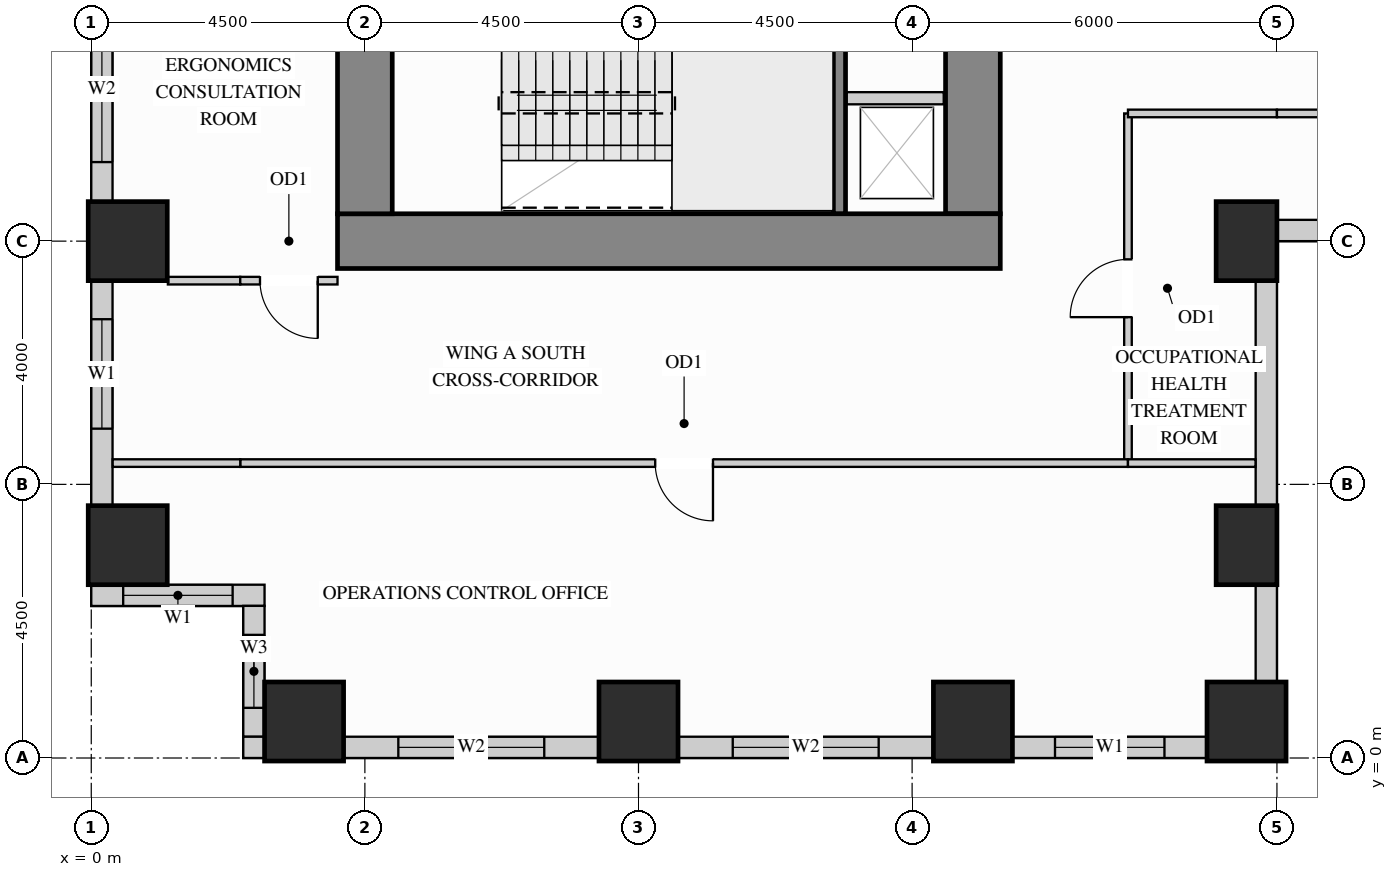
"""IFC4 building model, lengths in metres.
Left out: names, types, materials, properties, quantities, classifications, styles, units other than length and angle.
Written with IfcOpenShell. Run it as: python <this file> out.ifc"""

import sys

from ifc_helpers import new_model, si_unit, direction, frame, frame_2d, origin, origin_2d, place, context, subcontext, project, spatial, rectangle, extrude, source, transform, mapped, element, fill, save


model = new_model("IFC4")
c1 = context("Model", 3, precision=1e-05, world=origin(), true_north=direction((0.0, 1.0)))
c2 = subcontext(c1, "Body", "Model", "MODEL_VIEW")
j1 = project(units=[si_unit("LENGTHUNIT", "METRE"), si_unit("PLANEANGLEUNIT", "RADIAN")], contexts=[c1])
p1 = place(None, origin())
s1 = spatial("IfcSite", under=j1, at=p1, CompositionType="ELEMENT")
p2 = place(p1, origin())
s2 = spatial("IfcBuilding", under=s1, at=p2, CompositionType="ELEMENT")
p3 = place(p2, frame((0.0, 0.0, 54.9)))
s3 = spatial("IfcBuildingStorey", under=s2, at=p3, CompositionType="ELEMENT", Elevation=54.9)
m1 = source(origin(), c2, "Body", "SweptSolid", [
    extrude(rectangle(XDim=1.0, YDim=1.3, at=origin_2d()), origin(), (0.0, 0.0, 1.0), 3.38),
])
for number, where, z_axis, x_axis in (
    (1, (19.0, 3.5, 0.0), (0.0, 0.0, 1.0), (1.0, 0.0, 0.0)),
    (2, (19.0, 8.5, 0.0), (0.0, 0.0, 1.0), (1.0, 0.0, 0.0)),
):
    element("IfcColumn", number, at=place(p3, frame(where, z_axis=z_axis, x_axis=x_axis)), inside=s3, PredefinedType="COLUMN", context=c2, shape_type="MappedRepresentation", body=[
        mapped(m1, transform((0.0, 0.0, 0.0), x_axis=(1.0, 0.0, 0.0), y_axis=(0.0, 1.0, 0.0), z_axis=(0.0, 0.0, 1.0))),
    ])
m2 = source(origin(), c2, "Body", "SweptSolid", [
    extrude(rectangle(XDim=1.3, YDim=1.3, at=origin_2d()), origin(), (0.0, 0.0, 1.0), 3.38),
])
for number, where, z_axis, x_axis in (
    (3, (14.5, 0.6, 0.0), (0.0, 0.0, 1.0), (1.0, 0.0, 0.0)),
    (4, (19.0, 0.6, 0.0), (0.0, 0.0, 1.0), (1.0, 0.0, 0.0)),
    (5, (3.5, 0.6, 0.0), (0.0, 0.0, 1.0), (1.0, 0.0, 0.0)),
    (6, (9.0, 0.6, 0.0), (0.0, 0.0, 1.0), (1.0, 0.0, 0.0)),
    (7, (0.6, 3.5, 0.0), (0.0, 0.0, 1.0), (1.0, 0.0, 0.0)),
    (8, (0.6, 8.5, 0.0), (0.0, 0.0, 1.0), (1.0, 0.0, 0.0)),
):
    element("IfcColumn", number, at=place(p3, frame(where, z_axis=z_axis, x_axis=x_axis)), inside=s3, PredefinedType="COLUMN", context=c2, shape_type="MappedRepresentation", body=[
        mapped(m2, transform((0.0, 0.0, 0.0), x_axis=(1.0, 0.0, 0.0), y_axis=(0.0, 1.0, 0.0), z_axis=(0.0, 0.0, 1.0))),
    ])
m3 = source(origin(), c2, "Body", "SweptSolid", [
    extrude(rectangle(XDim=9.87, YDim=0.9, at=frame_2d((4.935, 0.0))), origin(), (0.0, 0.0, 1.0), 3.38),
])
p4 = place(p3, frame((14.5, 8.95, 0.0), z_axis=(0.0, 0.0, 1.0), x_axis=(0.0, 1.0, 0.0)))
e9 = element("IfcWall", 9, at=p4, inside=s3, PredefinedType="SHEAR", context=c2, shape_type="MappedRepresentation", body=[
    mapped(m3, transform((0.0, 0.0, 0.0), x_axis=(1.0, 0.0, 0.0), y_axis=(0.0, 1.0, 0.0), z_axis=(0.0, 0.0, 1.0))),
])
m4 = source(origin(), c2, "Body", "SweptSolid", [
    extrude(rectangle(XDim=10.9, YDim=0.9, at=frame_2d((5.45, 0.0))), origin(), (0.0, 0.0, 1.0), 3.38),
])
p5 = place(p3, frame((4.05, 8.5, 0.0), z_axis=(0.0, 0.0, 1.0), x_axis=(1.0, 0.0, 0.0)))
e10 = element("IfcWall", 10, at=p5, inside=s3, PredefinedType="SHEAR", context=c2, shape_type="MappedRepresentation", body=[
    mapped(m4, transform((0.0, 0.0, 0.0), x_axis=(1.0, 0.0, 0.0), y_axis=(0.0, 1.0, 0.0), z_axis=(0.0, 0.0, 1.0))),
])
m5 = source(origin(), c2, "Body", "SweptSolid", [
    extrude(rectangle(XDim=20.1, YDim=0.9, at=frame_2d((10.05, 0.0))), origin(), (0.0, 0.0, 1.0), 3.38),
])
p6 = place(p3, frame((4.5, 8.95, 0.0), z_axis=(0.0, 0.0, 1.0), x_axis=(0.0, 1.0, 0.0)))
e11 = element("IfcWall", 11, at=p6, inside=s3, PredefinedType="SHEAR", context=c2, shape_type="MappedRepresentation", body=[
    mapped(m5, transform((0.0, 0.0, 0.0), x_axis=(1.0, 0.0, 0.0), y_axis=(0.0, 1.0, 0.0), z_axis=(0.0, 0.0, 1.0))),
])
p7 = place(p3, frame((0.175, 12.852, 0.0), z_axis=(0.0, 0.0, 1.0), x_axis=(0.0, -1.0, 0.0)))
e12 = element("IfcWall", 12, at=p7, inside=s3, PredefinedType="SOLIDWALL", context=c2, shape_type="SweptSolid", body=[
    extrude(rectangle(XDim=3.704, YDim=0.35, at=frame_2d((1.852, 0.0))), origin(), (0.0, 0.0, 1.0), 2.51),
])
p8 = place(p7, frame((0.652, 0.0, 0.78)))
e13 = element("IfcOpeningElement", 13, at=p8, cuts=e12, PredefinedType="OPENING", context=c2, shape_type="SweptSolid", body=[
    extrude(rectangle(XDim=2.4, YDim=1.55, at=frame_2d((1.2, 0.775))), frame((0.0, 0.185, 0.0), z_axis=(0.0, -1.0, 0.0), x_axis=(1.0, 0.0, 0.0)), (0.0, 0.0, 1.0), 0.37),
])
p9 = place(p3, frame((0.175, 7.852, 0.0), z_axis=(0.0, 0.0, 1.0), x_axis=(0.0, -1.0, 0.0)))
e14 = element("IfcWall", 14, at=p9, inside=s3, PredefinedType="SOLIDWALL", context=c2, shape_type="SweptSolid", body=[
    extrude(rectangle(XDim=3.704, YDim=0.35, at=frame_2d((1.852, 0.0))), origin(), (0.0, 0.0, 1.0), 2.51),
])
p10 = place(p9, frame((0.636, 0.0, 0.78)))
e15 = element("IfcOpeningElement", 15, at=p10, cuts=e14, PredefinedType="OPENING", context=c2, shape_type="SweptSolid", body=[
    extrude(rectangle(XDim=1.8, YDim=1.55, at=frame_2d((0.9, 0.775))), frame((0.0, 0.185, 0.0), z_axis=(0.0, -1.0, 0.0), x_axis=(1.0, 0.0, 0.0)), (0.0, 0.0, 1.0), 0.37),
])
p11 = place(p3, frame((0.0, 2.675, 0.0), z_axis=(0.0, 0.0, 1.0), x_axis=(1.0, 0.0, 0.0)))
e16 = element("IfcWall", 16, at=p11, inside=s3, PredefinedType="SOLIDWALL", context=c2, shape_type="SweptSolid", body=[
    extrude(rectangle(XDim=2.85, YDim=0.35, at=frame_2d((1.425, 0.0))), origin(), (0.0, 0.0, 1.0), 3.365),
])
p12 = place(p11, frame((0.525, 0.0, 0.78)))
e17 = element("IfcOpeningElement", 17, at=p12, cuts=e16, PredefinedType="OPENING", context=c2, shape_type="SweptSolid", body=[
    extrude(rectangle(XDim=1.8, YDim=2.1, at=frame_2d((0.9, 1.05))), frame((0.0, 0.185, 0.0), z_axis=(0.0, -1.0, 0.0), x_axis=(1.0, 0.0, 0.0)), (0.0, 0.0, 1.0), 0.37),
])
p13 = place(p3, frame((2.675, 2.502, 0.0), z_axis=(0.0, 0.0, 1.0), x_axis=(0.0, -1.0, 0.0)))
e18 = element("IfcWall", 18, at=p13, inside=s3, PredefinedType="SOLIDWALL", context=c2, shape_type="SweptSolid", body=[
    extrude(rectangle(XDim=2.154, YDim=0.35, at=frame_2d((1.077, 0.0))), origin(), (0.0, 0.0, 1.0), 3.365),
])
p14 = place(p13, frame((0.477, 0.0, 0.78)))
e19 = element("IfcOpeningElement", 19, at=p14, cuts=e18, PredefinedType="OPENING", context=c2, shape_type="SweptSolid", body=[
    extrude(rectangle(XDim=1.2, YDim=2.1, at=frame_2d((0.6, 1.05))), frame((0.0, 0.185, 0.0), z_axis=(0.0, -1.0, 0.0), x_axis=(1.0, 0.0, 0.0)), (0.0, 0.0, 1.0), 0.37),
])
m6 = source(origin(), c2, "Body", "SweptSolid", [
    extrude(rectangle(XDim=0.352, YDim=0.35, at=frame_2d((0.176, 0.0))), origin(), (0.0, 0.0, 1.0), 3.365),
])
p15 = place(p3, frame((2.5, 0.175, 0.0), z_axis=(0.0, 0.0, 1.0), x_axis=(1.0, 0.0, 0.0)))
e20 = element("IfcWall", 20, at=p15, inside=s3, PredefinedType="SOLIDWALL", context=c2, shape_type="MappedRepresentation", body=[
    mapped(m6, transform((0.0, 0.0, 0.0), x_axis=(1.0, 0.0, 0.0), y_axis=(0.0, 1.0, 0.0), z_axis=(0.0, 0.0, 1.0))),
])
p16 = place(p3, frame((4.148, 0.175, 0.0), z_axis=(0.0, 0.0, 1.0), x_axis=(1.0, 0.0, 0.0)))
e21 = element("IfcWall", 21, at=p16, inside=s3, PredefinedType="SOLIDWALL", context=c2, shape_type="SweptSolid", body=[
    extrude(rectangle(XDim=4.204, YDim=0.35, at=frame_2d((2.102, 0.0))), origin(), (0.0, 0.0, 1.0), 2.51),
])
p17 = place(p16, frame((0.902, 0.0, 0.78)))
e22 = element("IfcOpeningElement", 22, at=p17, cuts=e21, PredefinedType="OPENING", context=c2, shape_type="SweptSolid", body=[
    extrude(rectangle(XDim=2.4, YDim=1.55, at=frame_2d((1.2, 0.775))), frame((0.0, 0.185, 0.0), z_axis=(0.0, -1.0, 0.0), x_axis=(1.0, 0.0, 0.0)), (0.0, 0.0, 1.0), 0.37),
])
p18 = place(p3, frame((9.648, 0.175, 0.0), z_axis=(0.0, 0.0, 1.0), x_axis=(1.0, 0.0, 0.0)))
e23 = element("IfcWall", 23, at=p18, inside=s3, PredefinedType="SOLIDWALL", context=c2, shape_type="SweptSolid", body=[
    extrude(rectangle(XDim=4.204, YDim=0.35, at=frame_2d((2.102, 0.0))), origin(), (0.0, 0.0, 1.0), 2.51),
])
p19 = place(p18, frame((0.902, 0.0, 0.78)))
e24 = element("IfcOpeningElement", 24, at=p19, cuts=e23, PredefinedType="OPENING", context=c2, shape_type="SweptSolid", body=[
    extrude(rectangle(XDim=2.4, YDim=1.55, at=frame_2d((1.2, 0.775))), frame((0.0, 0.185, 0.0), z_axis=(0.0, -1.0, 0.0), x_axis=(1.0, 0.0, 0.0)), (0.0, 0.0, 1.0), 0.37),
])
p20 = place(p3, frame((15.148, 0.175, 0.0), z_axis=(0.0, 0.0, 1.0), x_axis=(1.0, 0.0, 0.0)))
e25 = element("IfcWall", 25, at=p20, inside=s3, PredefinedType="SOLIDWALL", context=c2, shape_type="SweptSolid", body=[
    extrude(rectangle(XDim=3.204, YDim=0.35, at=frame_2d((1.602, 0.0))), origin(), (0.0, 0.0, 1.0), 2.51),
])
p21 = place(p20, frame((0.702, 0.0, 0.78)))
e26 = element("IfcOpeningElement", 26, at=p21, cuts=e25, PredefinedType="OPENING", context=c2, shape_type="SweptSolid", body=[
    extrude(rectangle(XDim=1.8, YDim=1.55, at=frame_2d((0.9, 0.775))), frame((0.0, 0.185, 0.0), z_axis=(0.0, -1.0, 0.0), x_axis=(1.0, 0.0, 0.0)), (0.0, 0.0, 1.0), 0.37),
])
m7 = source(origin(), c2, "Body", "SweptSolid", [
    extrude(rectangle(XDim=1.604, YDim=0.35, at=frame_2d((0.802, 0.0))), origin(), (0.0, 0.0, 1.0), 2.51),
])
p22 = place(p3, frame((19.325, 1.248, 0.0), z_axis=(0.0, 0.0, 1.0), x_axis=(0.0, 1.0, 0.0)))
e27 = element("IfcWall", 27, at=p22, inside=s3, PredefinedType="SOLIDWALL", context=c2, shape_type="MappedRepresentation", body=[
    mapped(m7, transform((0.0, 0.0, 0.0), x_axis=(1.0, 0.0, 0.0), y_axis=(0.0, 1.0, 0.0), z_axis=(0.0, 0.0, 1.0))),
])
m8 = source(origin(), c2, "Body", "SweptSolid", [
    extrude(rectangle(XDim=3.704, YDim=0.35, at=frame_2d((1.852, 0.0))), origin(), (0.0, 0.0, 1.0), 2.51),
])
p23 = place(p3, frame((19.325, 4.148, 0.0), z_axis=(0.0, 0.0, 1.0), x_axis=(0.0, 1.0, 0.0)))
e28 = element("IfcWall", 28, at=p23, inside=s3, PredefinedType="SOLIDWALL", context=c2, shape_type="MappedRepresentation", body=[
    mapped(m8, transform((0.0, 0.0, 0.0), x_axis=(1.0, 0.0, 0.0), y_axis=(0.0, 1.0, 0.0), z_axis=(0.0, 0.0, 1.0))),
])
p24 = place(p3, frame((19.498, 8.675, 0.0), z_axis=(0.0, 0.0, 1.0), x_axis=(1.0, 0.0, 0.0)))
e29 = element("IfcWall", 29, at=p24, inside=s3, PredefinedType="SOLIDWALL", context=c2, shape_type="SweptSolid", body=[
    extrude(rectangle(XDim=3.404, YDim=0.35, at=frame_2d((1.702, 0.0))), origin(), (0.0, 0.0, 1.0), 3.365),
])
p25 = place(p24, frame((0.952, 0.0, 0.78)))
e30 = element("IfcOpeningElement", 30, at=p25, cuts=e29, PredefinedType="OPENING", context=c2, shape_type="SweptSolid", body=[
    extrude(rectangle(XDim=1.5, YDim=2.0, at=frame_2d((0.75, 1.0))), frame((0.0, 0.185, 0.0), z_axis=(0.0, -1.0, 0.0), x_axis=(1.0, 0.0, 0.0)), (0.0, 0.0, 1.0), 0.37),
])
p26 = place(p3, frame((17.05, 4.85, 0.0), z_axis=(0.0, 0.0, 1.0), x_axis=(0.0, 1.0, 0.0)))
e31 = element("IfcWall", 31, at=p26, inside=s3, PredefinedType="PARTITIONING", context=c2, shape_type="SweptSolid", body=[
    extrude(rectangle(XDim=5.75, YDim=0.125, at=frame_2d((2.875, 0.0))), origin(), (0.0, 0.0, 1.0), 3.365),
])
p27 = place(p26, frame((2.4, 0.0, 0.0)))
e32 = element("IfcOpeningElement", 32, at=p27, cuts=e31, PredefinedType="OPENING", context=c2, shape_type="SweptSolid", body=[
    extrude(rectangle(XDim=0.95, YDim=2.15, at=frame_2d((0.475, 1.075))), frame((0.0, 0.073, 0.0), z_axis=(0.0, -1.0, 0.0), x_axis=(1.0, 0.0, 0.0)), (0.0, 0.0, 1.0), 0.145),
])
m9 = source(origin(), c2, "Body", "SweptSolid", [
    extrude(rectangle(XDim=1.19, YDim=0.125, at=frame_2d((0.595, 0.0))), origin(), (0.0, 0.0, 1.0), 3.365),
])
p28 = place(p3, frame((1.26, 7.85, 0.0), z_axis=(0.0, 0.0, 1.0), x_axis=(1.0, 0.0, 0.0)))
e33 = element("IfcWall", 33, at=p28, inside=s3, PredefinedType="PARTITIONING", context=c2, shape_type="MappedRepresentation", body=[
    mapped(m9, transform((0.0, 0.0, 0.0), x_axis=(1.0, 0.0, 0.0), y_axis=(0.0, 1.0, 0.0), z_axis=(0.0, 0.0, 1.0))),
])
p29 = place(p3, frame((2.45, 7.85, 0.0), z_axis=(0.0, 0.0, 1.0), x_axis=(1.0, 0.0, 0.0)))
e34 = element("IfcWall", 34, at=p29, inside=s3, PredefinedType="PARTITIONING", context=c2, shape_type="SweptSolid", body=[
    extrude(rectangle(XDim=1.6, YDim=0.125, at=frame_2d((0.8, 0.0))), origin(), (0.0, 0.0, 1.0), 3.365),
])
p30 = place(p29, frame((0.325, 0.0, 0.0)))
e35 = element("IfcOpeningElement", 35, at=p30, cuts=e34, PredefinedType="OPENING", context=c2, shape_type="SweptSolid", body=[
    extrude(rectangle(XDim=0.95, YDim=2.15, at=frame_2d((0.475, 1.075))), frame((0.0, 0.073, 0.0), z_axis=(0.0, -1.0, 0.0), x_axis=(1.0, 0.0, 0.0)), (0.0, 0.0, 1.0), 0.145),
])
m10 = source(origin(), c2, "Body", "SweptSolid", [
    extrude(rectangle(XDim=2.45, YDim=0.125, at=frame_2d((1.225, 0.0))), origin(), (0.0, 0.0, 1.0), 3.365),
])
p31 = place(p3, frame((17.05, 10.6, 0.0), z_axis=(0.0, 0.0, 1.0), x_axis=(1.0, 0.0, 0.0)))
e36 = element("IfcWall", 36, at=p31, inside=s3, PredefinedType="PARTITIONING", context=c2, shape_type="MappedRepresentation", body=[
    mapped(m10, transform((0.0, 0.0, 0.0), x_axis=(1.0, 0.0, 0.0), y_axis=(0.0, 1.0, 0.0), z_axis=(0.0, 0.0, 1.0))),
])
p32 = place(p3, frame((19.5, 10.6, 0.0), z_axis=(0.0, 0.0, 1.0), x_axis=(1.0, 0.0, 0.0)))
e37 = element("IfcWall", 37, at=p32, inside=s3, PredefinedType="PARTITIONING", context=c2, shape_type="SweptSolid", body=[
    extrude(rectangle(XDim=14.9, YDim=0.125, at=frame_2d((7.45, 0.0))), origin(), (0.0, 0.0, 1.0), 3.365),
])
p33 = place(p32, frame((6.975, 0.0, 0.0)))
e38 = element("IfcOpeningElement", 38, at=p33, cuts=e37, PredefinedType="OPENING", context=c2, shape_type="SweptSolid", body=[
    extrude(rectangle(XDim=0.95, YDim=2.15, at=frame_2d((0.475, 1.075))), frame((0.0, 0.073, 0.0), z_axis=(0.0, -1.0, 0.0), x_axis=(1.0, 0.0, 0.0)), (0.0, 0.0, 1.0), 0.145),
])
p34 = place(p3, frame((2.45, 4.85, 0.0), z_axis=(0.0, 0.0, 1.0), x_axis=(1.0, 0.0, 0.0)))
e39 = element("IfcWall", 39, at=p34, inside=s3, PredefinedType="PARTITIONING", context=c2, shape_type="SweptSolid", body=[
    extrude(rectangle(XDim=14.6, YDim=0.125, at=frame_2d((7.3, 0.0))), origin(), (0.0, 0.0, 1.0), 2.828),
])
p35 = place(p34, frame((6.825, 0.0, 0.0)))
e40 = element("IfcOpeningElement", 40, at=p35, cuts=e39, PredefinedType="OPENING", context=c2, shape_type="SweptSolid", body=[
    extrude(rectangle(XDim=0.95, YDim=2.15, at=frame_2d((0.475, 1.075))), frame((0.0, 0.073, 0.0), z_axis=(0.0, -1.0, 0.0), x_axis=(1.0, 0.0, 0.0)), (0.0, 0.0, 1.0), 0.145),
])
m11 = source(origin(), c2, "Body", "SweptSolid", [
    extrude(rectangle(XDim=2.098, YDim=0.125, at=frame_2d((1.049, 0.0))), origin(), (0.0, 0.0, 1.0), 2.828),
])
for number, where, z_axis, x_axis in (
    (41, (0.352, 4.85, 0.0), (0.0, 0.0, 1.0), (1.0, 0.0, 0.0)),
    (42, (17.05, 4.85, 0.0), (0.0, 0.0, 1.0), (1.0, 0.0, 0.0)),
):
    element("IfcWall", number, at=place(p3, frame(where, z_axis=z_axis, x_axis=x_axis)), inside=s3, PredefinedType="PARTITIONING", context=c2, shape_type="MappedRepresentation", body=[
        mapped(m11, transform((0.0, 0.0, 0.0), x_axis=(1.0, 0.0, 0.0), y_axis=(0.0, 1.0, 0.0), z_axis=(0.0, 0.0, 1.0))),
    ])
m12 = source(origin(), c2, "Body", "SweptSolid", [
    extrude(rectangle(XDim=1.6, YDim=0.2, at=frame_2d((0.8, 0.0))), origin(), (0.0, 0.0, 1.0), 3.365),
])
p36 = place(p3, frame((12.42, 10.85, 0.0), z_axis=(0.0, 0.0, 1.0), x_axis=(1.0, 0.0, 0.0)))
e43 = element("IfcWall", 43, at=p36, inside=s3, PredefinedType="PARTITIONING", context=c2, shape_type="MappedRepresentation", body=[
    mapped(m12, transform((0.0, 0.0, 0.0), x_axis=(1.0, 0.0, 0.0), y_axis=(0.0, 1.0, 0.0), z_axis=(0.0, 0.0, 1.0))),
])
m13 = source(origin(), c2, "Body", "SweptSolid", [
    extrude(rectangle(XDim=3.603, YDim=0.2, at=frame_2d((1.802, 0.0))), origin(), (0.0, 0.0, 1.0), 3.38),
])
p37 = place(p3, frame((12.305, 8.952, 0.0), z_axis=(0.0, 0.0, 1.0), x_axis=(0.0, 1.0, 0.0)))
e44 = element("IfcWall", 44, at=p37, inside=s3, PredefinedType="SHEAR", context=c2, shape_type="MappedRepresentation", body=[
    mapped(m13, transform((0.0, 0.0, 0.0), x_axis=(1.0, 0.0, 0.0), y_axis=(0.0, 1.0, 0.0), z_axis=(0.0, 0.0, 1.0))),
])
m14 = source(origin(), c2, "Body", "SweptSolid", [
    extrude(rectangle(XDim=0.95, YDim=2.15, at=frame_2d((0.475, 1.075))), frame((0.0, 0.025, 0.0), z_axis=(0.0, -1.0, 0.0), x_axis=(1.0, 0.0, 0.0)), (0.0, 0.0, 1.0), 0.05),
])
p38 = place(p27, origin())
e45 = element("IfcDoor", 45, at=p38, inside=s3, OperationType="SINGLE_SWING_LEFT", PredefinedType="DOOR", context=c2, shape_type="MappedRepresentation", body=[
    mapped(m14, transform((0.0, 0.0, 0.0), x_axis=(1.0, 0.0, 0.0), y_axis=(0.0, 1.0, 0.0), z_axis=(0.0, 0.0, 1.0))),
])
fill(e32, e45)
p39 = place(p35, origin())
e46 = element("IfcDoor", 46, at=p39, inside=s3, OperationType="SINGLE_SWING_RIGHT", PredefinedType="DOOR", context=c2, shape_type="MappedRepresentation", body=[
    mapped(m14, transform((0.0, 0.0, 0.0), x_axis=(1.0, 0.0, 0.0), y_axis=(0.0, 1.0, 0.0), z_axis=(0.0, 0.0, 1.0))),
])
fill(e40, e46)
p40 = place(p30, origin())
e47 = element("IfcDoor", 47, at=p40, inside=s3, OperationType="SINGLE_SWING_RIGHT", PredefinedType="DOOR", context=c2, shape_type="MappedRepresentation", body=[
    mapped(m14, transform((0.0, 0.0, 0.0), x_axis=(1.0, 0.0, 0.0), y_axis=(0.0, 1.0, 0.0), z_axis=(0.0, 0.0, 1.0))),
])
fill(e35, e47)
m15 = source(origin(), c2, "Body", "SweptSolid", [
    extrude(rectangle(XDim=1.8, YDim=1.55, at=frame_2d((0.9, 0.775))), frame((0.0, 0.03, 0.0), z_axis=(0.0, -1.0, 0.0), x_axis=(1.0, 0.0, 0.0)), (0.0, 0.0, 1.0), 0.06),
])
p41 = place(p10, origin())
e48 = element("IfcWindow", 48, at=p41, inside=s3, PartitioningType="SINGLE_PANEL", PredefinedType="WINDOW", context=c2, shape_type="MappedRepresentation", body=[
    mapped(m15, transform((0.0, 0.0, 0.0), x_axis=(1.0, 0.0, 0.0), y_axis=(0.0, 1.0, 0.0), z_axis=(0.0, 0.0, 1.0))),
])
fill(e15, e48)
m16 = source(origin(), c2, "Body", "SweptSolid", [
    extrude(rectangle(XDim=1.8, YDim=2.1, at=frame_2d((0.9, 1.05))), frame((0.0, 0.03, 0.0), z_axis=(0.0, -1.0, 0.0), x_axis=(1.0, 0.0, 0.0)), (0.0, 0.0, 1.0), 0.06),
])
p42 = place(p12, origin())
e49 = element("IfcWindow", 49, at=p42, inside=s3, PartitioningType="SINGLE_PANEL", PredefinedType="WINDOW", context=c2, shape_type="MappedRepresentation", body=[
    mapped(m16, transform((0.0, 0.0, 0.0), x_axis=(1.0, 0.0, 0.0), y_axis=(0.0, 1.0, 0.0), z_axis=(0.0, 0.0, 1.0))),
])
fill(e17, e49)
p43 = place(p21, origin())
e50 = element("IfcWindow", 50, at=p43, inside=s3, PartitioningType="SINGLE_PANEL", PredefinedType="WINDOW", context=c2, shape_type="MappedRepresentation", body=[
    mapped(m15, transform((0.0, 0.0, 0.0), x_axis=(1.0, 0.0, 0.0), y_axis=(0.0, 1.0, 0.0), z_axis=(0.0, 0.0, 1.0))),
])
fill(e26, e50)
m17 = source(origin(), c2, "Body", "SweptSolid", [
    extrude(rectangle(XDim=2.4, YDim=1.55, at=frame_2d((1.2, 0.775))), frame((0.0, 0.03, 0.0), z_axis=(0.0, -1.0, 0.0), x_axis=(1.0, 0.0, 0.0)), (0.0, 0.0, 1.0), 0.06),
])
p44 = place(p8, origin())
e51 = element("IfcWindow", 51, at=p44, inside=s3, PartitioningType="SINGLE_PANEL", PredefinedType="WINDOW", context=c2, shape_type="MappedRepresentation", body=[
    mapped(m17, transform((0.0, 0.0, 0.0), x_axis=(1.0, 0.0, 0.0), y_axis=(0.0, 1.0, 0.0), z_axis=(0.0, 0.0, 1.0))),
])
fill(e13, e51)
p45 = place(p17, origin())
e52 = element("IfcWindow", 52, at=p45, inside=s3, PartitioningType="SINGLE_PANEL", PredefinedType="WINDOW", context=c2, shape_type="MappedRepresentation", body=[
    mapped(m17, transform((0.0, 0.0, 0.0), x_axis=(1.0, 0.0, 0.0), y_axis=(0.0, 1.0, 0.0), z_axis=(0.0, 0.0, 1.0))),
])
fill(e22, e52)
p46 = place(p19, origin())
e53 = element("IfcWindow", 53, at=p46, inside=s3, PartitioningType="SINGLE_PANEL", PredefinedType="WINDOW", context=c2, shape_type="MappedRepresentation", body=[
    mapped(m17, transform((0.0, 0.0, 0.0), x_axis=(1.0, 0.0, 0.0), y_axis=(0.0, 1.0, 0.0), z_axis=(0.0, 0.0, 1.0))),
])
fill(e24, e53)
m18 = source(origin(), c2, "Body", "SweptSolid", [
    extrude(rectangle(XDim=1.2, YDim=2.1, at=frame_2d((0.6, 1.05))), frame((0.0, 0.03, 0.0), z_axis=(0.0, -1.0, 0.0), x_axis=(1.0, 0.0, 0.0)), (0.0, 0.0, 1.0), 0.06),
])
p47 = place(p14, origin())
e54 = element("IfcWindow", 54, at=p47, inside=s3, PartitioningType="SINGLE_PANEL", PredefinedType="WINDOW", context=c2, shape_type="MappedRepresentation", body=[
    mapped(m18, transform((0.0, 0.0, 0.0), x_axis=(1.0, 0.0, 0.0), y_axis=(0.0, 1.0, 0.0), z_axis=(0.0, 0.0, 1.0))),
])
fill(e19, e54)
save(model, sys.argv[1])
